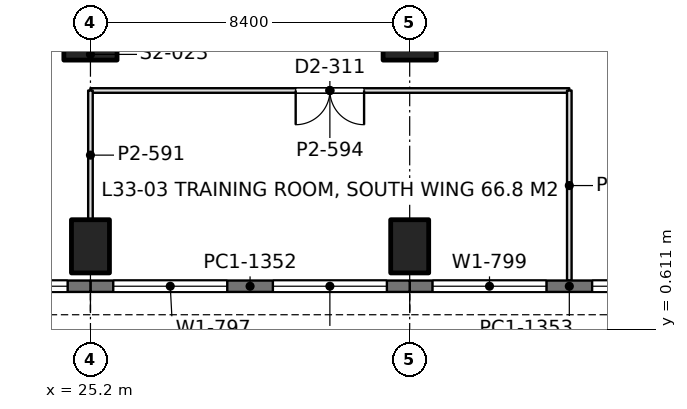
"""IFC4 building model, lengths in metres.
Left out: names, types, materials, properties, quantities, classifications, styles, units other than length and angle.
Written with IfcOpenShell. Run it as: python <this file> out.ifc"""

import sys

from ifc_helpers import new_model, si_unit, direction, frame, frame_2d, origin, origin_2d, place, context, subcontext, project, spatial, rectangle, extrude, element, fill, save


model = new_model("IFC4")
c1 = context("Model", 3, precision=1e-05, world=origin(), true_north=direction((0.0, 1.0)))
c2 = subcontext(c1, "Body", "Model", "MODEL_VIEW")
j1 = project(units=[si_unit("LENGTHUNIT", "METRE"), si_unit("PLANEANGLEUNIT", "RADIAN")], contexts=[c1])
p1 = place(None, origin())
s1 = spatial("IfcSite", under=j1, at=p1, CompositionType="ELEMENT")
p2 = place(p1, origin())
s2 = spatial("IfcBuilding", under=s1, at=p2, CompositionType="ELEMENT")
p3 = place(p2, frame((0.0, 0.0, 147.0)))
s3 = spatial("IfcBuildingStorey", under=s2, at=p3, CompositionType="ELEMENT", Elevation=147.0)
p4 = place(p3, frame((25.2, 2.8, 0.0), z_axis=(0.0, 0.0, 1.0), x_axis=(1.0, 0.0, 0.0)))
e1 = element("IfcColumn", 1, at=p4, inside=s3, PredefinedType="COLUMN", context=c2, shape_type="SweptSolid", body=[
    extrude(rectangle(XDim=1.0, YDim=1.4, at=origin_2d()), origin(), (0.0, 0.0, 1.0), 4.2),
])
p5 = place(p3, frame((25.2, 8.4, 0.0), z_axis=(0.0, 0.0, 1.0), x_axis=(1.0, 0.0, 0.0)))
e2 = element("IfcColumn", 2, at=p5, inside=s3, PredefinedType="COLUMN", context=c2, shape_type="SweptSolid", body=[
    extrude(rectangle(XDim=1.4, YDim=1.4, at=origin_2d()), origin(), (0.0, 0.0, 1.0), 4.2),
])
p6 = place(p3, frame((33.6, 2.8, 0.0), z_axis=(0.0, 0.0, 1.0), x_axis=(1.0, 0.0, 0.0)))
e3 = element("IfcColumn", 3, at=p6, inside=s3, PredefinedType="COLUMN", context=c2, shape_type="SweptSolid", body=[
    extrude(rectangle(XDim=1.0, YDim=1.4, at=origin_2d()), origin(), (0.0, 0.0, 1.0), 4.2),
])
p7 = place(p3, frame((33.6, 8.4, 0.0), z_axis=(0.0, 0.0, 1.0), x_axis=(1.0, 0.0, 0.0)))
e4 = element("IfcColumn", 4, at=p7, inside=s3, PredefinedType="COLUMN", context=c2, shape_type="SweptSolid", body=[
    extrude(rectangle(XDim=1.4, YDim=1.4, at=origin_2d()), origin(), (0.0, 0.0, 1.0), 4.2),
])
p8 = place(p3, frame((42.0, 1.75, 0.0), z_axis=(0.0, 0.0, 1.0), x_axis=(-1.0, 0.0, 0.0)))
e5 = element("IfcWall", 5, at=p8, inside=s3, PredefinedType="SOLIDWALL", context=c2, shape_type="SweptSolid", body=[
    extrude(rectangle(XDim=8.4, YDim=0.3, at=frame_2d((4.2, 0.0))), origin(), (0.0, 0.0, 1.0), 4.05),
])
p9 = place(p8, frame((0.6, 0.0, 0.9)))
e6 = element("IfcOpeningElement", 6, at=p9, cuts=e5, PredefinedType="OPENING", context=c2, shape_type="SweptSolid", body=[
    extrude(rectangle(XDim=3.0, YDim=1.9, at=frame_2d((1.5, 0.95))), frame((0.0, 0.16, 0.0), z_axis=(0.0, -1.0, 0.0), x_axis=(1.0, 0.0, 0.0)), (0.0, 0.0, 1.0), 0.32),
])
p10 = place(p8, frame((4.8, 0.0, 0.9)))
e7 = element("IfcOpeningElement", 7, at=p10, cuts=e5, PredefinedType="OPENING", context=c2, shape_type="SweptSolid", body=[
    extrude(rectangle(XDim=3.0, YDim=1.9, at=frame_2d((1.5, 0.95))), frame((0.0, 0.16, 0.0), z_axis=(0.0, -1.0, 0.0), x_axis=(1.0, 0.0, 0.0)), (0.0, 0.0, 1.0), 0.32),
])
p11 = place(p3, frame((33.6, 1.75, 0.0), z_axis=(0.0, 0.0, 1.0), x_axis=(-1.0, 0.0, 0.0)))
e8 = element("IfcWall", 8, at=p11, inside=s3, PredefinedType="SOLIDWALL", context=c2, shape_type="SweptSolid", body=[
    extrude(rectangle(XDim=8.4, YDim=0.3, at=frame_2d((4.2, 0.0))), origin(), (0.0, 0.0, 1.0), 4.05),
])
p12 = place(p11, frame((0.6, 0.0, 0.9)))
e9 = element("IfcOpeningElement", 9, at=p12, cuts=e8, PredefinedType="OPENING", context=c2, shape_type="SweptSolid", body=[
    extrude(rectangle(XDim=3.0, YDim=1.9, at=frame_2d((1.5, 0.95))), frame((0.0, 0.16, 0.0), z_axis=(0.0, -1.0, 0.0), x_axis=(1.0, 0.0, 0.0)), (0.0, 0.0, 1.0), 0.32),
])
p13 = place(p11, frame((4.8, 0.0, 0.9)))
e10 = element("IfcOpeningElement", 10, at=p13, cuts=e8, PredefinedType="OPENING", context=c2, shape_type="SweptSolid", body=[
    extrude(rectangle(XDim=3.0, YDim=1.9, at=frame_2d((1.5, 0.95))), frame((0.0, 0.16, 0.0), z_axis=(0.0, -1.0, 0.0), x_axis=(1.0, 0.0, 0.0)), (0.0, 0.0, 1.0), 0.32),
])
p14 = place(p3, frame((25.2, 1.75, 0.0), z_axis=(0.0, 0.0, 1.0), x_axis=(-1.0, 0.0, 0.0)))
e11 = element("IfcWall", 11, at=p14, inside=s3, PredefinedType="SOLIDWALL", context=c2, shape_type="SweptSolid", body=[
    extrude(rectangle(XDim=8.4, YDim=0.3, at=frame_2d((4.2, 0.0))), origin(), (0.0, 0.0, 1.0), 4.05),
])
p15 = place(p14, frame((0.6, 0.0, 0.9)))
e12 = element("IfcOpeningElement", 12, at=p15, cuts=e11, PredefinedType="OPENING", context=c2, shape_type="SweptSolid", body=[
    extrude(rectangle(XDim=3.0, YDim=1.9, at=frame_2d((1.5, 0.95))), frame((0.0, 0.16, 0.0), z_axis=(0.0, -1.0, 0.0), x_axis=(1.0, 0.0, 0.0)), (0.0, 0.0, 1.0), 0.32),
])
p16 = place(p14, frame((4.8, 0.0, 0.9)))
e13 = element("IfcOpeningElement", 13, at=p16, cuts=e11, PredefinedType="OPENING", context=c2, shape_type="SweptSolid", body=[
    extrude(rectangle(XDim=3.0, YDim=1.9, at=frame_2d((1.5, 0.95))), frame((0.0, 0.16, 0.0), z_axis=(0.0, -1.0, 0.0), x_axis=(1.0, 0.0, 0.0)), (0.0, 0.0, 1.0), 0.32),
])
p17 = place(p3, frame((25.2, 6.9, 0.0), z_axis=(0.0, 0.0, 1.0), x_axis=(1.0, 0.0, 0.0)))
e14 = element("IfcWall", 14, at=p17, inside=s3, PredefinedType="PARTITIONING", context=c2, shape_type="SweptSolid", body=[
    extrude(rectangle(XDim=12.6, YDim=0.12, at=frame_2d((6.3, 0.0))), origin(), (0.0, 0.0, 1.0), 3.55),
])
p18 = place(p17, frame((5.4, 0.0, 0.0)))
e15 = element("IfcOpeningElement", 15, at=p18, cuts=e14, PredefinedType="OPENING", context=c2, shape_type="SweptSolid", body=[
    extrude(rectangle(XDim=1.8, YDim=2.2, at=frame_2d((0.9, 1.1))), frame((0.0, 0.07, 0.0), z_axis=(0.0, -1.0, 0.0), x_axis=(1.0, 0.0, 0.0)), (0.0, 0.0, 1.0), 0.14),
])
p19 = place(p3, frame((25.2, 3.499, 0.0), z_axis=(0.0, 0.0, 1.0), x_axis=(0.0, 1.0, 0.0)))
e16 = element("IfcWall", 16, at=p19, inside=s3, PredefinedType="PARTITIONING", context=c2, shape_type="SweptSolid", body=[
    extrude(rectangle(XDim=3.401, YDim=0.12, at=frame_2d((1.7, 0.0))), origin(), (0.0, 0.0, 1.0), 3.55),
])
p20 = place(p3, frame((37.8, 1.898, 0.0), z_axis=(0.0, 0.0, 1.0), x_axis=(0.0, 1.0, 0.0)))
e17 = element("IfcWall", 17, at=p20, inside=s3, PredefinedType="PARTITIONING", context=c2, shape_type="SweptSolid", body=[
    extrude(rectangle(XDim=5.002, YDim=0.12, at=frame_2d((2.501, 0.0))), origin(), (0.0, 0.0, 1.0), 3.56),
])
p21 = place(p9, origin())
e18 = element("IfcWindow", 18, at=p21, inside=s3, PartitioningType="SINGLE_PANEL", PredefinedType="WINDOW", context=c2, shape_type="SweptSolid", body=[
    extrude(rectangle(XDim=3.0, YDim=1.9, at=frame_2d((1.5, 0.95))), frame((0.0, 0.03, 0.0), z_axis=(0.0, -1.0, 0.0), x_axis=(1.0, 0.0, 0.0)), (0.0, 0.0, 1.0), 0.06),
])
fill(e6, e18)
p22 = place(p10, origin())
e19 = element("IfcWindow", 19, at=p22, inside=s3, PartitioningType="SINGLE_PANEL", PredefinedType="WINDOW", context=c2, shape_type="SweptSolid", body=[
    extrude(rectangle(XDim=3.0, YDim=1.9, at=frame_2d((1.5, 0.95))), frame((0.0, 0.03, 0.0), z_axis=(0.0, -1.0, 0.0), x_axis=(1.0, 0.0, 0.0)), (0.0, 0.0, 1.0), 0.06),
])
fill(e7, e19)
p23 = place(p12, origin())
e20 = element("IfcWindow", 20, at=p23, inside=s3, PartitioningType="SINGLE_PANEL", PredefinedType="WINDOW", context=c2, shape_type="SweptSolid", body=[
    extrude(rectangle(XDim=3.0, YDim=1.9, at=frame_2d((1.5, 0.95))), frame((0.0, 0.03, 0.0), z_axis=(0.0, -1.0, 0.0), x_axis=(1.0, 0.0, 0.0)), (0.0, 0.0, 1.0), 0.06),
])
fill(e9, e20)
p24 = place(p13, origin())
e21 = element("IfcWindow", 21, at=p24, inside=s3, PartitioningType="SINGLE_PANEL", PredefinedType="WINDOW", context=c2, shape_type="SweptSolid", body=[
    extrude(rectangle(XDim=3.0, YDim=1.9, at=frame_2d((1.5, 0.95))), frame((0.0, 0.03, 0.0), z_axis=(0.0, -1.0, 0.0), x_axis=(1.0, 0.0, 0.0)), (0.0, 0.0, 1.0), 0.06),
])
fill(e10, e21)
p25 = place(p15, origin())
e22 = element("IfcWindow", 22, at=p25, inside=s3, PartitioningType="SINGLE_PANEL", PredefinedType="WINDOW", context=c2, shape_type="SweptSolid", body=[
    extrude(rectangle(XDim=3.0, YDim=1.9, at=frame_2d((1.5, 0.95))), frame((0.0, 0.03, 0.0), z_axis=(0.0, -1.0, 0.0), x_axis=(1.0, 0.0, 0.0)), (0.0, 0.0, 1.0), 0.06),
])
fill(e12, e22)
p26 = place(p18, frame((1.8, 0.0, 0.0), z_axis=(0.0, 0.0, 1.0), x_axis=(-1.0, 0.0, 0.0)))
e23 = element("IfcDoor", 23, at=p26, inside=s3, OperationType="DOUBLE_DOOR_SINGLE_SWING", PredefinedType="DOOR", context=c2, shape_type="SweptSolid", body=[
    extrude(rectangle(XDim=1.8, YDim=2.2, at=frame_2d((0.9, 1.1))), frame((0.0, 0.025, 0.0), z_axis=(0.0, -1.0, 0.0), x_axis=(1.0, 0.0, 0.0)), (0.0, 0.0, 1.0), 0.05),
])
fill(e15, e23)
save(model, sys.argv[1])
